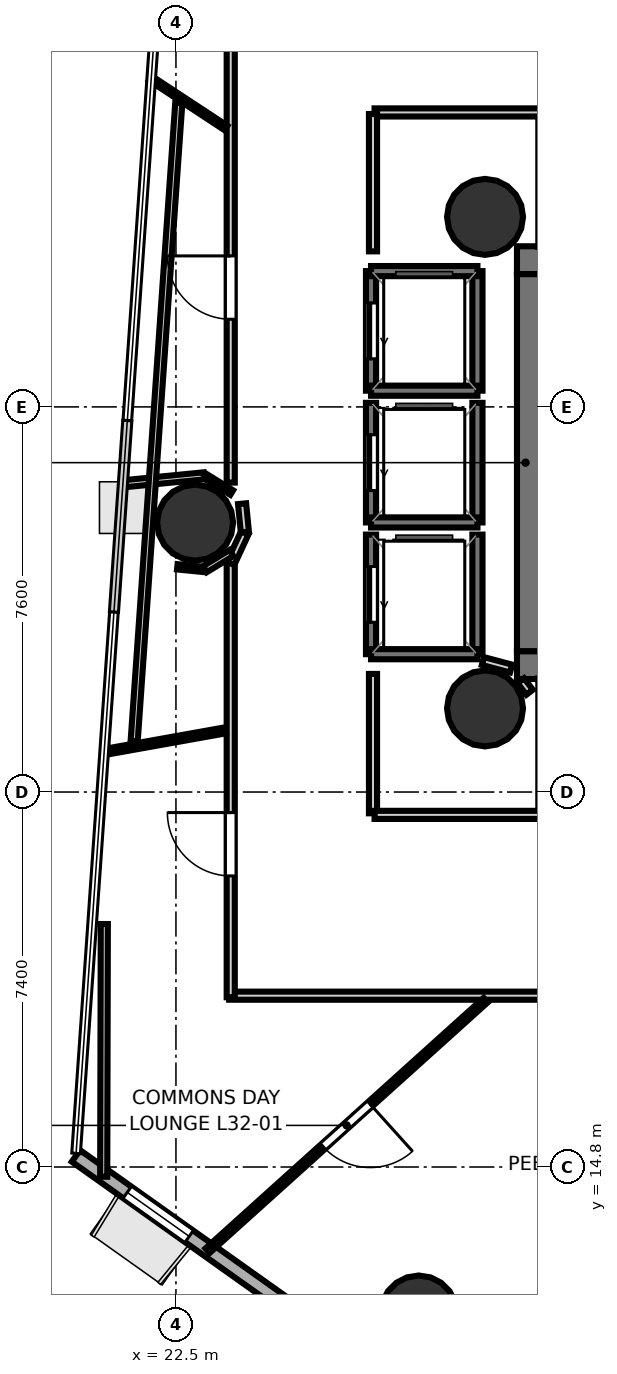
"""IFC4 building model, lengths in metres.
Left out: names, types, materials, properties, quantities, classifications, styles, units other than length and angle.
Written with IfcOpenShell. Run it as: python <this file> out.ifc"""

import sys

from ifc_helpers import new_model, si_unit, direction, frame, frame_2d, origin, origin_2d, place, context, subcontext, project, spatial, rectangle, hollow_circle, extrude, element, fill, save


model = new_model("IFC4")
c1 = context("Model", 3, precision=1e-05, world=origin(), true_north=direction((0.0, 1.0)))
c2 = subcontext(c1, "Body", "Model", "MODEL_VIEW")
j1 = project(units=[si_unit("LENGTHUNIT", "METRE"), si_unit("PLANEANGLEUNIT", "RADIAN")], contexts=[c1])
p1 = place(None, origin())
s1 = spatial("IfcSite", under=j1, at=p1, CompositionType="ELEMENT")
p2 = place(p1, origin())
s2 = spatial("IfcBuilding", under=s1, at=p2, CompositionType="ELEMENT")
p3 = place(p2, frame((0.0, 0.0, 127.4)))
s3 = spatial("IfcBuildingStorey", under=s2, at=p3, CompositionType="ELEMENT", Elevation=127.4)
p4 = place(p3, frame((29.23, 32.695, 0.0), z_axis=(0.0, 0.0, 1.0), x_axis=(1.0, 0.0, 0.0)))
e1 = element("IfcWall", 1, at=p4, inside=s3, PredefinedType="SHEAR", context=c2, shape_type="SweptSolid", body=[
    extrude(rectangle(XDim=10.62, YDim=0.55, at=frame_2d((5.31, 0.0))), origin(), (0.0, 0.0, 1.0), 3.52),
])
p5 = place(p4, frame((0.995, 0.0, 0.0)))
e2 = element("IfcOpeningElement", 2, at=p5, cuts=e1, PredefinedType="OPENING", context=c2, shape_type="SweptSolid", body=[
    extrude(rectangle(XDim=1.25, YDim=2.15, at=frame_2d((0.625, 1.075))), frame((0.0, 0.285, 0.0), z_axis=(0.0, -1.0, 0.0), x_axis=(1.0, 0.0, 0.0)), (0.0, 0.0, 1.0), 0.57),
])
p6 = place(p3, frame((29.23, 24.705, 0.0), z_axis=(0.0, 0.0, 1.0), x_axis=(1.0, 0.0, 0.0)))
e3 = element("IfcWall", 3, at=p6, inside=s3, PredefinedType="SHEAR", context=c2, shape_type="SweptSolid", body=[
    extrude(rectangle(XDim=10.62, YDim=0.55, at=frame_2d((5.31, 0.0))), origin(), (0.0, 0.0, 1.0), 3.52),
])
p7 = place(p6, frame((0.795, 0.0, 0.0)))
e4 = element("IfcOpeningElement", 4, at=p7, cuts=e3, PredefinedType="OPENING", context=c2, shape_type="SweptSolid", body=[
    extrude(rectangle(XDim=1.25, YDim=2.15, at=frame_2d((0.625, 1.075))), frame((0.0, 0.285, 0.0), z_axis=(0.0, -1.0, 0.0), x_axis=(1.0, 0.0, 0.0)), (0.0, 0.0, 1.0), 0.57),
])
p8 = place(p3, frame((29.505, 24.98, 0.0), z_axis=(0.0, 0.0, 1.0), x_axis=(0.0, 1.0, 0.0)))
e5 = element("IfcWall", 5, at=p8, inside=s3, PredefinedType="SHEAR", context=c2, shape_type="SweptSolid", body=[
    extrude(rectangle(XDim=7.44, YDim=0.55, at=frame_2d((3.72, 0.0))), origin(), (0.0, 0.0, 1.0), 3.52),
])
for number, where, z_axis, x_axis in (
    (6, (28.6, 33.55, 0.0), (0.0, 0.0, 1.0), (1.0, 0.0, 0.0)),
    (7, (28.6, 23.85, 0.0), (0.0, 0.0, 1.0), (1.0, 0.0, 0.0)),
    (8, (22.878, 27.516, 0.0), (0.0, 0.0, 1.0), (1.0, 0.0, 0.0)),
    (9, (27.292, 11.909, 0.0), (0.0, 0.0, 1.0), (1.0, 0.0, 0.0)),
):
    element("IfcColumn", number, at=place(p3, frame(where, z_axis=z_axis, x_axis=x_axis)), inside=s3, PredefinedType="COLUMN", context=c2, shape_type="SweptSolid", body=[
        extrude(hollow_circle(Radius=0.75, WallThickness=0.036, at=origin_2d()), origin(), (0.0, 0.0, 1.0), 3.7),
    ])
p9 = place(p3, frame((20.526, 15.019, 0.0), z_axis=(0.0, 0.0, 1.0), x_axis=(0.81527780656, -0.579070028693, 0.0)))
e10 = element("IfcWall", 10, at=p9, inside=s3, PredefinedType="SOLIDWALL", context=c2, shape_type="SweptSolid", body=[
    extrude(rectangle(XDim=9.841, YDim=0.28, at=frame_2d((4.92, 0.0))), origin(), (0.0, 0.0, 1.0), 3.52),
])
p10 = place(p9, frame((1.242, 0.0, 0.85)))
e11 = element("IfcOpeningElement", 11, at=p10, cuts=e10, PredefinedType="OPENING", context=c2, shape_type="SweptSolid", body=[
    extrude(rectangle(XDim=1.5, YDim=2.1, at=frame_2d((0.75, 1.05))), frame((0.0, 0.15, 0.0), z_axis=(0.0, -1.0, 0.0), x_axis=(1.0, 0.0, 0.0)), (0.0, 0.0, 1.0), 0.3),
])
p11 = place(p9, frame((6.139, 0.0, 0.85)))
e12 = element("IfcOpeningElement", 12, at=p11, cuts=e10, PredefinedType="OPENING", context=c2, shape_type="SweptSolid", body=[
    extrude(rectangle(XDim=1.5, YDim=2.1, at=frame_2d((0.75, 1.05))), frame((0.0, 0.15, 0.0), z_axis=(0.0, -1.0, 0.0), x_axis=(1.0, 0.0, 0.0)), (0.0, 0.0, 1.0), 0.3),
])
p12 = place(p3, frame((28.45, 30.12, 0.0), z_axis=(0.0, 0.0, 1.0), x_axis=(0.0, 1.0, 0.0)))
e13 = element("IfcWall", 13, at=p12, inside=s3, PredefinedType="SOLIDWALL", context=c2, shape_type="SweptSolid", body=[
    extrude(rectangle(XDim=2.36, YDim=0.2, at=frame_2d((1.18, 0.0))), origin(), (0.0, 0.0, 1.0), 3.52),
])
p13 = place(p3, frame((26.35, 30.12, 0.0), z_axis=(0.0, 0.0, 1.0), x_axis=(0.0, 1.0, 0.0)))
e14 = element("IfcWall", 14, at=p13, inside=s3, PredefinedType="SOLIDWALL", context=c2, shape_type="SweptSolid", body=[
    extrude(rectangle(XDim=2.36, YDim=0.2, at=frame_2d((1.18, 0.0))), origin(), (0.0, 0.0, 1.0), 3.52),
])
p14 = place(p13, frame((0.63, 0.0, 0.0)))
e15 = element("IfcOpeningElement", 15, at=p14, cuts=e14, PredefinedType="OPENING", context=c2, shape_type="SweptSolid", body=[
    extrude(rectangle(XDim=1.1, YDim=2.15, at=frame_2d((0.55, 1.075))), frame((0.0, 0.11, 0.0), z_axis=(0.0, -1.0, 0.0), x_axis=(1.0, 0.0, 0.0)), (0.0, 0.0, 1.0), 0.22),
])
for number, where, z_axis, x_axis in (
    (16, (26.35, 32.48, 0.0), (0.0, 0.0, 1.0), (1.0, 0.0, 0.0)),
    (17, (26.35, 30.12, 0.0), (0.0, 0.0, 1.0), (1.0, 0.0, 0.0)),
):
    element("IfcWall", number, at=place(p3, frame(where, z_axis=z_axis, x_axis=x_axis)), inside=s3, PredefinedType="SOLIDWALL", context=c2, shape_type="SweptSolid", body=[
        extrude(rectangle(XDim=2.1, YDim=0.2, at=frame_2d((1.05, 0.0))), origin(), (0.0, 0.0, 1.0), 3.52),
    ])
p15 = place(p3, frame((28.45, 27.52, 0.0), z_axis=(0.0, 0.0, 1.0), x_axis=(0.0, 1.0, 0.0)))
e18 = element("IfcWall", 18, at=p15, inside=s3, PredefinedType="SOLIDWALL", context=c2, shape_type="SweptSolid", body=[
    extrude(rectangle(XDim=2.36, YDim=0.2, at=frame_2d((1.18, 0.0))), origin(), (0.0, 0.0, 1.0), 3.52),
])
p16 = place(p3, frame((26.35, 27.52, 0.0), z_axis=(0.0, 0.0, 1.0), x_axis=(0.0, 1.0, 0.0)))
e19 = element("IfcWall", 19, at=p16, inside=s3, PredefinedType="SOLIDWALL", context=c2, shape_type="SweptSolid", body=[
    extrude(rectangle(XDim=2.36, YDim=0.2, at=frame_2d((1.18, 0.0))), origin(), (0.0, 0.0, 1.0), 3.52),
])
p17 = place(p16, frame((0.63, 0.0, 0.0)))
e20 = element("IfcOpeningElement", 20, at=p17, cuts=e19, PredefinedType="OPENING", context=c2, shape_type="SweptSolid", body=[
    extrude(rectangle(XDim=1.1, YDim=2.15, at=frame_2d((0.55, 1.075))), frame((0.0, 0.11, 0.0), z_axis=(0.0, -1.0, 0.0), x_axis=(1.0, 0.0, 0.0)), (0.0, 0.0, 1.0), 0.22),
])
p18 = place(p3, frame((26.35, 27.52, 0.0), z_axis=(0.0, 0.0, 1.0), x_axis=(1.0, 0.0, 0.0)))
e21 = element("IfcWall", 21, at=p18, inside=s3, PredefinedType="SOLIDWALL", context=c2, shape_type="SweptSolid", body=[
    extrude(rectangle(XDim=2.1, YDim=0.2, at=frame_2d((1.05, 0.0))), origin(), (0.0, 0.0, 1.0), 3.52),
])
p19 = place(p3, frame((28.45, 24.92, 0.0), z_axis=(0.0, 0.0, 1.0), x_axis=(0.0, 1.0, 0.0)))
e22 = element("IfcWall", 22, at=p19, inside=s3, PredefinedType="SOLIDWALL", context=c2, shape_type="SweptSolid", body=[
    extrude(rectangle(XDim=2.36, YDim=0.2, at=frame_2d((1.18, 0.0))), origin(), (0.0, 0.0, 1.0), 3.52),
])
p20 = place(p3, frame((26.35, 24.92, 0.0), z_axis=(0.0, 0.0, 1.0), x_axis=(0.0, 1.0, 0.0)))
e23 = element("IfcWall", 23, at=p20, inside=s3, PredefinedType="SOLIDWALL", context=c2, shape_type="SweptSolid", body=[
    extrude(rectangle(XDim=2.36, YDim=0.2, at=frame_2d((1.18, 0.0))), origin(), (0.0, 0.0, 1.0), 3.52),
])
p21 = place(p20, frame((0.63, 0.0, 0.0)))
e24 = element("IfcOpeningElement", 24, at=p21, cuts=e23, PredefinedType="OPENING", context=c2, shape_type="SweptSolid", body=[
    extrude(rectangle(XDim=1.1, YDim=2.15, at=frame_2d((0.55, 1.075))), frame((0.0, 0.11, 0.0), z_axis=(0.0, -1.0, 0.0), x_axis=(1.0, 0.0, 0.0)), (0.0, 0.0, 1.0), 0.22),
])
p22 = place(p3, frame((26.35, 24.92, 0.0), z_axis=(0.0, 0.0, 1.0), x_axis=(1.0, 0.0, 0.0)))
e25 = element("IfcWall", 25, at=p22, inside=s3, PredefinedType="SOLIDWALL", context=c2, shape_type="SweptSolid", body=[
    extrude(rectangle(XDim=2.1, YDim=0.2, at=frame_2d((1.05, 0.0))), origin(), (0.0, 0.0, 1.0), 3.52),
])
p23 = place(p3, frame((29.48, 24.169, 0.0), z_axis=(0.0, 0.0, 1.0), x_axis=(-0.607608252226, 0.794236873878, 0.0)))
e26 = element("IfcWall", 26, at=p23, inside=s3, PredefinedType="PARTITIONING", context=c2, shape_type="SweptSolid", body=[
    extrude(rectangle(XDim=0.286, YDim=0.16, at=frame_2d((0.143, 0.0))), origin(), (0.0, 0.0, 1.0), 2.84),
])
p24 = place(p3, frame((29.114, 24.637, 0.0), z_axis=(0.0, 0.0, 1.0), x_axis=(-0.966199685486, 0.257794817183, 0.0)))
e27 = element("IfcWall", 27, at=p24, inside=s3, PredefinedType="PARTITIONING", context=c2, shape_type="SweptSolid", body=[
    extrude(rectangle(XDim=0.575, YDim=0.16, at=frame_2d((0.288, 0.0))), origin(), (0.0, 0.0, 1.0), 2.84),
])
p25 = place(p3, frame((23.581, 28.307, 0.0), z_axis=(0.0, 0.0, 1.0), x_axis=(0.0, 1.0, 0.0)))
e28 = element("IfcWall", 28, at=p25, inside=s3, PredefinedType="PARTITIONING", context=c2, shape_type="SweptSolid", body=[
    extrude(rectangle(XDim=11.656, YDim=0.16, at=frame_2d((5.828, 0.0))), origin(), (0.0, 0.0, 1.0), 2.84),
])
p26 = place(p25, frame((3.223, 0.0, 0.0)))
e29 = element("IfcOpeningElement", 29, at=p26, cuts=e28, PredefinedType="OPENING", context=c2, shape_type="SweptSolid", body=[
    extrude(rectangle(XDim=1.25, YDim=2.2, at=frame_2d((0.625, 1.1))), frame((0.0, 0.09, 0.0), z_axis=(0.0, -1.0, 0.0), x_axis=(1.0, 0.0, 0.0)), (0.0, 0.0, 1.0), 0.18),
])
p27 = place(p3, frame((29.7, 35.611, 0.0), z_axis=(0.0, 0.0, 1.0), x_axis=(-1.0, 0.0, 0.0)))
e30 = element("IfcWall", 30, at=p27, inside=s3, PredefinedType="PARTITIONING", context=c2, shape_type="SweptSolid", body=[
    extrude(rectangle(XDim=3.28, YDim=0.16, at=frame_2d((1.64, 0.0))), origin(), (0.0, 0.0, 1.0), 2.84),
])
p28 = place(p3, frame((26.389, 35.58, 0.0), z_axis=(0.0, 0.0, 1.0), x_axis=(0.0, -1.0, 0.0)))
e31 = element("IfcWall", 31, at=p28, inside=s3, PredefinedType="PARTITIONING", context=c2, shape_type="SweptSolid", body=[
    extrude(rectangle(XDim=2.71, YDim=0.16, at=frame_2d((1.355, 0.0))), origin(), (0.0, 0.0, 1.0), 2.84),
])
p29 = place(p3, frame((26.389, 24.531, 0.0), z_axis=(0.0, 0.0, 1.0), x_axis=(0.0, -1.0, 0.0)))
e32 = element("IfcWall", 32, at=p29, inside=s3, PredefinedType="PARTITIONING", context=c2, shape_type="SweptSolid", body=[
    extrude(rectangle(XDim=2.75, YDim=0.16, at=frame_2d((1.375, 0.0))), origin(), (0.0, 0.0, 1.0), 2.84),
])
p30 = place(p3, frame((26.42, 21.749, 0.0), z_axis=(0.0, 0.0, 1.0), x_axis=(1.0, 0.0, 0.0)))
e33 = element("IfcWall", 33, at=p30, inside=s3, PredefinedType="PARTITIONING", context=c2, shape_type="SweptSolid", body=[
    extrude(rectangle(XDim=3.28, YDim=0.16, at=frame_2d((1.64, 0.0))), origin(), (0.0, 0.0, 1.0), 2.84),
])
p31 = place(p3, frame((33.32, 18.181, 0.0), z_axis=(0.0, 0.0, 1.0), x_axis=(-1.0, 0.0, 0.0)))
e34 = element("IfcWall", 34, at=p31, inside=s3, PredefinedType="PARTITIONING", context=c2, shape_type="SweptSolid", body=[
    extrude(rectangle(XDim=9.77, YDim=0.16, at=frame_2d((4.885, 0.0))), origin(), (0.0, 0.0, 1.0), 2.84),
])
p32 = place(p3, frame((23.581, 18.15, 0.0), z_axis=(0.0, 0.0, 1.0), x_axis=(0.0, 1.0, 0.0)))
e35 = element("IfcWall", 35, at=p32, inside=s3, PredefinedType="PARTITIONING", context=c2, shape_type="SweptSolid", body=[
    extrude(rectangle(XDim=8.575, YDim=0.16, at=frame_2d((4.288, 0.0))), origin(), (0.0, 0.0, 1.0), 2.84),
])
p33 = place(p32, frame((2.394, 0.0, 0.0)))
e36 = element("IfcOpeningElement", 36, at=p33, cuts=e35, PredefinedType="OPENING", context=c2, shape_type="SweptSolid", body=[
    extrude(rectangle(XDim=1.25, YDim=2.2, at=frame_2d((0.625, 1.1))), frame((0.0, 0.09, 0.0), z_axis=(0.0, -1.0, 0.0), x_axis=(1.0, 0.0, 0.0)), (0.0, 0.0, 1.0), 0.18),
])
p34 = place(p3, frame((23.578, 26.712, 0.0), z_axis=(0.0, 0.0, 1.0), x_axis=(0.421251946418, 0.906943657367, 0.0)))
e37 = element("IfcWall", 37, at=p34, inside=s3, PredefinedType="PARTITIONING", context=c2, shape_type="SweptSolid", body=[
    extrude(rectangle(XDim=0.663, YDim=0.16, at=frame_2d((0.332, 0.0))), origin(), (0.0, 0.0, 1.0), 2.84),
])
p35 = place(p3, frame((23.86, 27.33, 0.0), z_axis=(0.0, 0.0, 1.0), x_axis=(-0.098000919071, 0.995186324193, 0.0)))
e38 = element("IfcWall", 38, at=p35, inside=s3, PredefinedType="PARTITIONING", context=c2, shape_type="SweptSolid", body=[
    extrude(rectangle(XDim=0.563, YDim=0.16, at=frame_2d((0.281, 0.0))), origin(), (0.0, 0.0, 1.0), 2.84),
])
p36 = place(p3, frame((21.063, 22.986, 0.0), z_axis=(0.0, 0.0, 1.0), x_axis=(0.984366560864, 0.176131978505, 0.0)))
e39 = element("IfcWall", 39, at=p36, inside=s3, PredefinedType="PARTITIONING", context=c2, shape_type="SweptSolid", body=[
    extrude(rectangle(XDim=2.451, YDim=0.12, at=frame_2d((1.225, 0.0))), origin(), (0.0, 0.0, 1.0), 2.84),
])
p37 = place(p3, frame((28.613, 18.093, 0.0), z_axis=(0.0, 0.0, 1.0), x_axis=(-0.742996622941, -0.669295165303, 0.0)))
e40 = element("IfcWall", 40, at=p37, inside=s3, PredefinedType="PARTITIONING", context=c2, shape_type="SweptSolid", body=[
    extrude(rectangle(XDim=7.387, YDim=0.12, at=frame_2d((3.693, 0.0))), origin(), (0.0, 0.0, 1.0), 2.84),
])
p38 = place(p37, frame((3.069, 0.0, 0.0)))
e41 = element("IfcOpeningElement", 41, at=p38, cuts=e40, PredefinedType="OPENING", context=c2, shape_type="SweptSolid", body=[
    extrude(rectangle(XDim=1.25, YDim=2.2, at=frame_2d((0.625, 1.1))), frame((0.0, 0.07, 0.0), z_axis=(0.0, -1.0, 0.0), x_axis=(1.0, 0.0, 0.0)), (0.0, 0.0, 1.0), 0.14),
])
p39 = place(p3, frame((21.074, 14.608, 0.0), z_axis=(0.0, 0.0, 1.0), x_axis=(0.002399013904, 0.999997122362, 0.0)))
e42 = element("IfcWall", 42, at=p39, inside=s3, PredefinedType="PARTITIONING", context=c2, shape_type="SweptSolid", body=[
    extrude(rectangle(XDim=4.987, YDim=0.14, at=frame_2d((2.493, 0.0))), origin(), (0.0, 0.0, 1.0), 2.84),
])
p40 = place(p3, frame((23.487, 35.305, 0.0), z_axis=(0.0, 0.0, 1.0), x_axis=(-0.835441859879, 0.549578837623, 0.0)))
e43 = element("IfcWall", 43, at=p40, inside=s3, PredefinedType="PARTITIONING", context=c2, shape_type="SweptSolid", body=[
    extrude(rectangle(XDim=1.786, YDim=0.105, at=frame_2d((0.893, 0.0))), origin(), (0.0, 0.0, 1.0), 2.84),
])
p41 = place(p3, frame((23.6, 28.11, 0.0), z_axis=(0.0, 0.0, 1.0), x_axis=(-0.851712341449, 0.524009625316, 0.0)))
e44 = element("IfcWall", 44, at=p41, inside=s3, PredefinedType="PARTITIONING", context=c2, shape_type="SweptSolid", body=[
    extrude(rectangle(XDim=0.621, YDim=0.105, at=frame_2d((0.31, 0.0))), origin(), (0.0, 0.0, 1.0), 2.84),
])
p42 = place(p3, frame((23.052, 28.439, 0.0), z_axis=(0.0, 0.0, 1.0), x_axis=(-0.99517438114, -0.098122123514, 0.0)))
e45 = element("IfcWall", 45, at=p42, inside=s3, PredefinedType="PARTITIONING", context=c2, shape_type="SweptSolid", body=[
    extrude(rectangle(XDim=1.627, YDim=0.14, at=frame_2d((0.813, 0.0))), origin(), (0.0, 0.0, 1.0), 2.84),
])
p43 = place(p3, frame((22.527, 26.644, 0.0), z_axis=(0.0, 0.0, 1.0), x_axis=(0.995191506225, -0.09794828195, 0.0)))
e46 = element("IfcWall", 46, at=p43, inside=s3, PredefinedType="PARTITIONING", context=c2, shape_type="SweptSolid", body=[
    extrude(rectangle(XDim=0.528, YDim=0.105, at=frame_2d((0.264, 0.0))), origin(), (0.0, 0.0, 1.0), 2.84),
])
p44 = place(p3, frame((23.072, 26.597, 0.0), z_axis=(0.0, 0.0, 1.0), x_axis=(0.853675286084, 0.520805631622, 0.0)))
e47 = element("IfcWall", 47, at=p44, inside=s3, PredefinedType="PARTITIONING", context=c2, shape_type="SweptSolid", body=[
    extrude(rectangle(XDim=0.613, YDim=0.14, at=frame_2d((0.307, 0.0))), origin(), (0.0, 0.0, 1.0), 2.84),
])
p45 = place(p3, frame((21.675, 23.205, 0.0), z_axis=(0.0, 0.0, 1.0), x_axis=(0.069755805167, 0.997564097011, 0.0)))
e48 = element("IfcWall", 48, at=p45, inside=s3, PredefinedType="PARTITIONING", context=c2, shape_type="SweptSolid", body=[
    extrude(rectangle(XDim=12.624, YDim=0.14, at=frame_2d((6.312, 0.0))), origin(), (0.0, 0.0, 1.0), 2.84),
])
p46 = place(p14, origin())
e49 = element("IfcDoor", 49, at=p46, inside=s3, OperationType="SLIDING_TO_LEFT", PredefinedType="DOOR", context=c2, shape_type="SweptSolid", body=[
    extrude(rectangle(XDim=1.1, YDim=2.15, at=frame_2d((0.55, 1.075))), frame((0.0, 0.025, 0.0), z_axis=(0.0, -1.0, 0.0), x_axis=(1.0, 0.0, 0.0)), (0.0, 0.0, 1.0), 0.05),
])
fill(e15, e49)
p47 = place(p17, origin())
e50 = element("IfcDoor", 50, at=p47, inside=s3, OperationType="SLIDING_TO_LEFT", PredefinedType="DOOR", context=c2, shape_type="SweptSolid", body=[
    extrude(rectangle(XDim=1.1, YDim=2.15, at=frame_2d((0.55, 1.075))), frame((0.0, 0.025, 0.0), z_axis=(0.0, -1.0, 0.0), x_axis=(1.0, 0.0, 0.0)), (0.0, 0.0, 1.0), 0.05),
])
fill(e20, e50)
p48 = place(p21, origin())
e51 = element("IfcDoor", 51, at=p48, inside=s3, OperationType="SLIDING_TO_LEFT", PredefinedType="DOOR", context=c2, shape_type="SweptSolid", body=[
    extrude(rectangle(XDim=1.1, YDim=2.15, at=frame_2d((0.55, 1.075))), frame((0.0, 0.025, 0.0), z_axis=(0.0, -1.0, 0.0), x_axis=(1.0, 0.0, 0.0)), (0.0, 0.0, 1.0), 0.05),
])
fill(e24, e51)
p49 = place(p33, origin())
e52 = element("IfcDoor", 52, at=p49, inside=s3, OperationType="SINGLE_SWING_RIGHT", PredefinedType="DOOR", context=c2, shape_type="SweptSolid", body=[
    extrude(rectangle(XDim=1.25, YDim=2.2, at=frame_2d((0.625, 1.1))), frame((0.0, 0.025, 0.0), z_axis=(0.0, -1.0, 0.0), x_axis=(1.0, 0.0, 0.0)), (0.0, 0.0, 1.0), 0.05),
])
fill(e36, e52)
p50 = place(p26, origin())
e53 = element("IfcDoor", 53, at=p50, inside=s3, OperationType="SINGLE_SWING_RIGHT", PredefinedType="DOOR", context=c2, shape_type="SweptSolid", body=[
    extrude(rectangle(XDim=1.25, YDim=2.2, at=frame_2d((0.625, 1.1))), frame((0.0, 0.025, 0.0), z_axis=(0.0, -1.0, 0.0), x_axis=(1.0, 0.0, 0.0)), (0.0, 0.0, 1.0), 0.05),
])
fill(e29, e53)
p51 = place(p38, origin())
e54 = element("IfcDoor", 54, at=p51, inside=s3, OperationType="SINGLE_SWING_LEFT", PredefinedType="DOOR", context=c2, shape_type="SweptSolid", body=[
    extrude(rectangle(XDim=1.25, YDim=2.2, at=frame_2d((0.625, 1.1))), frame((0.0, 0.025, 0.0), z_axis=(0.0, -1.0, 0.0), x_axis=(1.0, 0.0, 0.0)), (0.0, 0.0, 1.0), 0.05),
])
fill(e41, e54)
p52 = place(p10, origin())
e55 = element("IfcWindow", 55, at=p52, inside=s3, PartitioningType="SINGLE_PANEL", PredefinedType="WINDOW", context=c2, shape_type="SweptSolid", body=[
    extrude(rectangle(XDim=1.5, YDim=2.1, at=frame_2d((0.75, 1.05))), frame((0.0, 0.03, 0.0), z_axis=(0.0, -1.0, 0.0), x_axis=(1.0, 0.0, 0.0)), (0.0, 0.0, 1.0), 0.06),
])
fill(e11, e55)
save(model, sys.argv[1])
